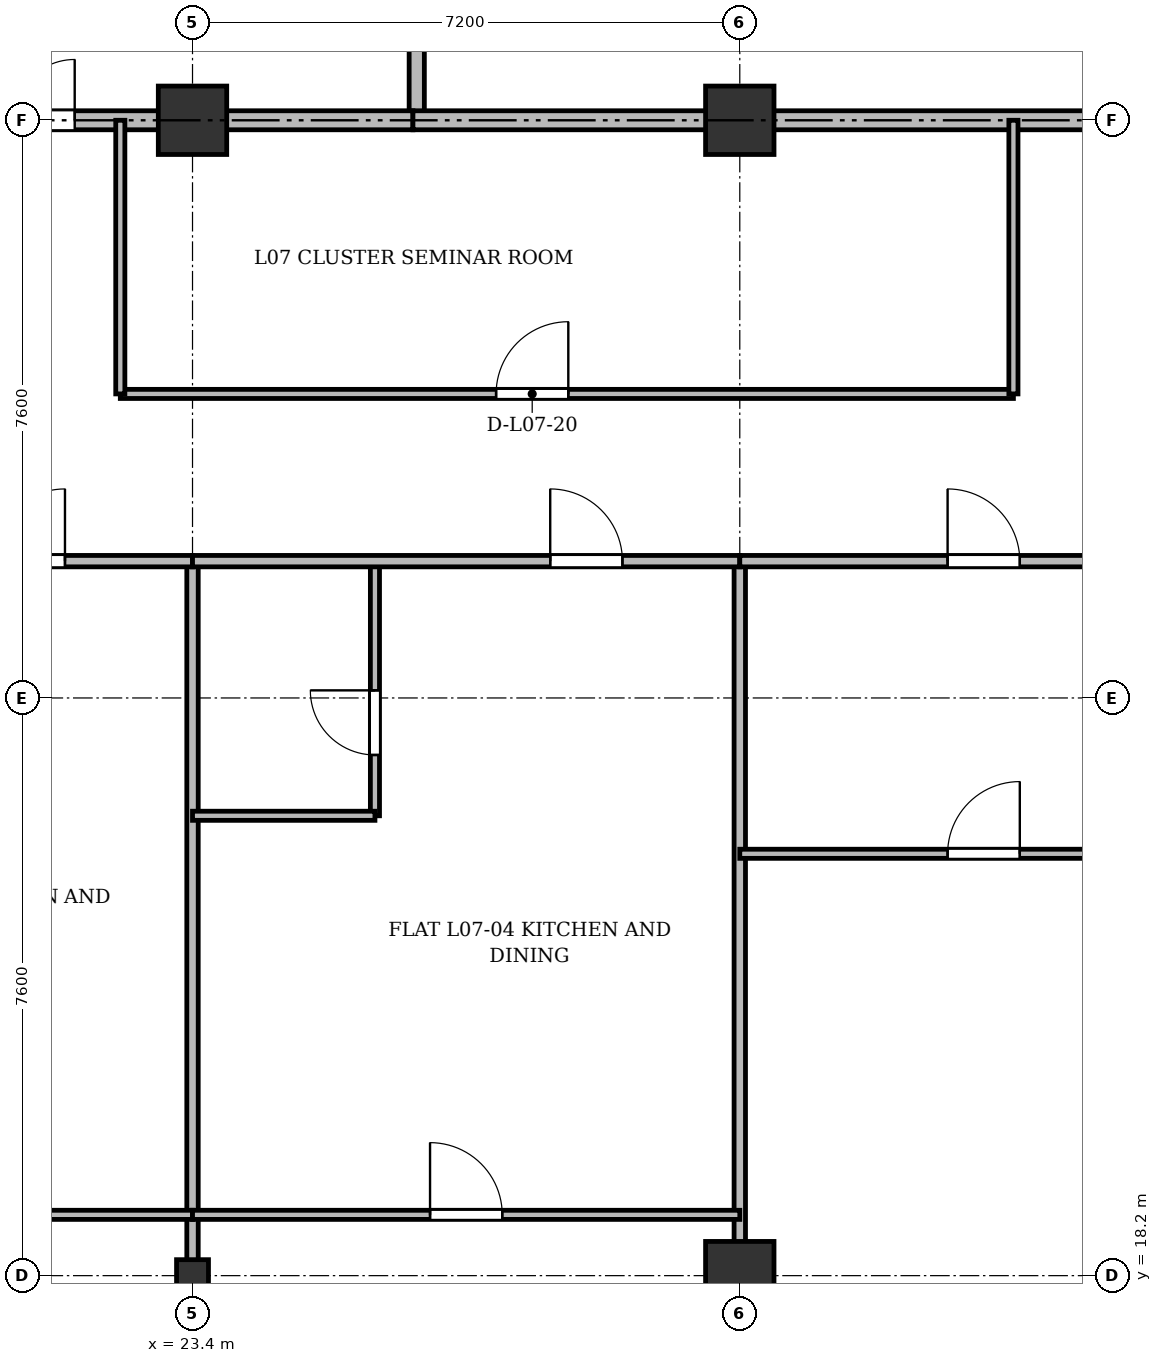
"""IFC4 building model, lengths in metres.
Left out: names, types, materials, properties, quantities, classifications, styles, units other than length and angle.
Written with IfcOpenShell. Run it as: python <this file> out.ifc"""

import sys

from ifc_helpers import new_model, si_unit, direction, frame, frame_2d, origin, origin_2d, place, context, subcontext, project, spatial, rectangle, i_section, extrude, source, transform, mapped, element, fill, save


model = new_model("IFC4")
c1 = context("Model", 3, precision=1e-05, world=origin(), true_north=direction((0.0, 1.0)))
c2 = subcontext(c1, "Body", "Model", "MODEL_VIEW")
j1 = project(units=[si_unit("LENGTHUNIT", "METRE"), si_unit("PLANEANGLEUNIT", "RADIAN")], contexts=[c1])
p1 = place(None, origin())
s1 = spatial("IfcSite", under=j1, at=p1, CompositionType="ELEMENT")
p2 = place(p1, origin())
s2 = spatial("IfcBuilding", under=s1, at=p2, CompositionType="ELEMENT")
p3 = place(p2, frame((0.0, 0.0, 30.7)))
s3 = spatial("IfcBuildingStorey", under=s2, at=p3, CompositionType="ELEMENT", Elevation=30.7)
m1 = source(origin(), c2, "Body", "SweptSolid", [
    extrude(i_section(OverallWidth=0.42, OverallDepth=0.42, WebThickness=0.026, FlangeThickness=0.04, at=origin_2d()), origin(), (0.0, 0.0, 1.0), 3.6),
])
p4 = place(p3, frame((23.4, 18.2, 0.0), z_axis=(0.0, 0.0, 1.0), x_axis=(1.0, 0.0, 0.0)))
e1 = element("IfcColumn", 1, at=p4, inside=s3, PredefinedType="COLUMN", context=c2, shape_type="MappedRepresentation", body=[
    mapped(m1, transform((0.0, 0.0, 0.0), x_axis=(1.0, 0.0, 0.0), y_axis=(0.0, 1.0, 0.0), z_axis=(0.0, 0.0, 1.0), scale=1.0)),
])
m2 = source(origin(), c2, "Body", "SweptSolid", [
    extrude(rectangle(XDim=0.9, YDim=0.9, at=origin_2d()), origin(), (0.0, 0.0, 1.0), 3.6),
])
for number, where, z_axis, x_axis in (
    (2, (23.4, 33.4, 0.0), (0.0, 0.0, 1.0), (1.0, 0.0, 0.0)),
    (3, (30.6, 18.2, 0.0), (0.0, 0.0, 1.0), (1.0, 0.0, 0.0)),
    (4, (30.6, 33.4, 0.0), (0.0, 0.0, 1.0), (1.0, 0.0, 0.0)),
):
    element("IfcColumn", number, at=place(p3, frame(where, z_axis=z_axis, x_axis=x_axis)), inside=s3, PredefinedType="COLUMN", context=c2, shape_type="MappedRepresentation", body=[
        mapped(m2, transform((0.0, 0.0, 0.0), x_axis=(1.0, 0.0, 0.0), y_axis=(0.0, 1.0, 0.0), z_axis=(0.0, 0.0, 1.0), scale=1.0)),
    ])
p5 = place(p3, frame((26.35, 33.4, 0.0), z_axis=(0.0, 0.0, 1.0), x_axis=(0.0, 1.0, 0.0)))
e5 = element("IfcWall", 5, at=p5, inside=s3, PredefinedType="SOLIDWALL", context=c2, shape_type="SweptSolid", body=[
    extrude(rectangle(XDim=11.3, YDim=0.2, at=frame_2d((5.65, 0.0))), origin(), (0.0, 0.0, 1.0), 2.69),
])
p6 = place(p3, frame((19.5, 33.4, 0.0), z_axis=(0.0, 0.0, 1.0), x_axis=(1.0, 0.0, 0.0)))
e6 = element("IfcWall", 6, at=p6, inside=s3, PredefinedType="PARTITIONING", context=c2, shape_type="SweptSolid", body=[
    extrude(rectangle(XDim=6.8, YDim=0.25, at=frame_2d((3.4, 0.0))), origin(), (0.0, 0.0, 1.0), 2.69),
])
p7 = place(p6, frame((0.75, 0.0, 0.0)))
e7 = element("IfcOpeningElement", 7, at=p7, cuts=e6, PredefinedType="OPENING", context=c2, shape_type="SweptSolid", body=[
    extrude(rectangle(XDim=1.6, YDim=2.2, at=frame_2d((0.8, 1.1))), frame((0.0, 0.135, 0.0), z_axis=(0.0, -1.0, 0.0), x_axis=(1.0, 0.0, 0.0)), (0.0, 0.0, 1.0), 0.27),
])
p8 = place(p3, frame((26.3, 33.4, 0.0), z_axis=(0.0, 0.0, 1.0), x_axis=(1.0, 0.0, 0.0)))
e8 = element("IfcWall", 8, at=p8, inside=s3, PredefinedType="PARTITIONING", context=c2, shape_type="SweptSolid", body=[
    extrude(rectangle(XDim=20.85, YDim=0.25, at=frame_2d((10.425, 0.0))), origin(), (0.0, 0.0, 1.0), 2.69),
])
p9 = place(p8, frame((9.2, 0.0, 0.0)))
e9 = element("IfcOpeningElement", 9, at=p9, cuts=e8, PredefinedType="OPENING", context=c2, shape_type="SweptSolid", body=[
    extrude(rectangle(XDim=1.6, YDim=2.2, at=frame_2d((0.8, 1.1))), frame((0.0, 0.135, 0.0), z_axis=(0.0, -1.0, 0.0), x_axis=(1.0, 0.0, 0.0)), (0.0, 0.0, 1.0), 0.27),
])
p10 = place(p3, frame((22.45, 29.8, 0.0), z_axis=(0.0, 0.0, 1.0), x_axis=(1.0, 0.0, 0.0)))
e10 = element("IfcWall", 10, at=p10, inside=s3, PredefinedType="PARTITIONING", context=c2, shape_type="SweptSolid", body=[
    extrude(rectangle(XDim=11.75, YDim=0.12, at=frame_2d((5.875, 0.0))), origin(), (0.0, 0.0, 1.0), 2.752),
])
p11 = place(p10, frame((4.944, 0.0, 0.0)))
e11 = element("IfcOpeningElement", 11, at=p11, cuts=e10, PredefinedType="OPENING", context=c2, shape_type="SweptSolid", body=[
    extrude(rectangle(XDim=0.95, YDim=2.15, at=frame_2d((0.475, 1.075))), frame((0.0, 0.07, 0.0), z_axis=(0.0, -1.0, 0.0), x_axis=(1.0, 0.0, 0.0)), (0.0, 0.0, 1.0), 0.14),
])
for number, where, z_axis, x_axis in (
    (12, (22.45, 29.8, 0.0), (0.0, 0.0, 1.0), (0.0, 1.0, 0.0)),
    (13, (34.2, 29.8, 0.0), (0.0, 0.0, 1.0), (0.0, 1.0, 0.0)),
):
    element("IfcWall", number, at=place(p3, frame(where, z_axis=z_axis, x_axis=x_axis)), inside=s3, PredefinedType="PARTITIONING", context=c2, shape_type="SweptSolid", body=[
        extrude(rectangle(XDim=3.6, YDim=0.12, at=frame_2d((1.8, 0.0))), origin(), (0.0, 0.0, 1.0), 2.69),
    ])
for number, where, z_axis, x_axis in (
    (14, (23.4, 3.145, 0.0), (0.0, 0.0, 1.0), (0.0, 1.0, 0.0)),
    (15, (30.6, 3.145, 0.0), (0.0, 0.0, 1.0), (0.0, 1.0, 0.0)),
):
    element("IfcWall", number, at=place(p3, frame(where, z_axis=z_axis, x_axis=x_axis)), inside=s3, PredefinedType="PARTITIONING", context=c2, shape_type="SweptSolid", body=[
        extrude(rectangle(XDim=24.455, YDim=0.15, at=frame_2d((12.228, 0.0))), origin(), (0.0, 0.0, 1.0), 2.752),
    ])
p12 = place(p3, frame((15.6, 19.0, 0.0), z_axis=(0.0, 0.0, 1.0), x_axis=(1.0, 0.0, 0.0)))
e16 = element("IfcWall", 16, at=p12, inside=s3, PredefinedType="PARTITIONING", context=c2, shape_type="SweptSolid", body=[
    extrude(rectangle(XDim=7.8, YDim=0.12, at=frame_2d((3.9, 0.0))), origin(), (0.0, 0.0, 1.0), 2.752),
])
p13 = place(p12, frame((3.333, 0.0, 0.0)))
e17 = element("IfcOpeningElement", 17, at=p13, cuts=e16, PredefinedType="OPENING", context=c2, shape_type="SweptSolid", body=[
    extrude(rectangle(XDim=0.95, YDim=2.15, at=frame_2d((0.475, 1.075))), frame((0.0, 0.07, 0.0), z_axis=(0.0, -1.0, 0.0), x_axis=(1.0, 0.0, 0.0)), (0.0, 0.0, 1.0), 0.14),
])
p14 = place(p3, frame((15.6, 27.6, 0.0), z_axis=(0.0, 0.0, 1.0), x_axis=(1.0, 0.0, 0.0)))
e18 = element("IfcWall", 18, at=p14, inside=s3, PredefinedType="PARTITIONING", context=c2, shape_type="SweptSolid", body=[
    extrude(rectangle(XDim=7.8, YDim=0.15, at=frame_2d((3.9, 0.0))), origin(), (0.0, 0.0, 1.0), 2.752),
])
p15 = place(p14, frame((5.172, 0.0, 0.0)))
e19 = element("IfcOpeningElement", 19, at=p15, cuts=e18, PredefinedType="OPENING", context=c2, shape_type="SweptSolid", body=[
    extrude(rectangle(XDim=0.95, YDim=2.15, at=frame_2d((0.475, 1.075))), frame((0.0, 0.085, 0.0), z_axis=(0.0, -1.0, 0.0), x_axis=(1.0, 0.0, 0.0)), (0.0, 0.0, 1.0), 0.17),
])
p16 = place(p3, frame((23.4, 19.0, 0.0), z_axis=(0.0, 0.0, 1.0), x_axis=(1.0, 0.0, 0.0)))
e20 = element("IfcWall", 20, at=p16, inside=s3, PredefinedType="PARTITIONING", context=c2, shape_type="SweptSolid", body=[
    extrude(rectangle(XDim=7.2, YDim=0.12, at=frame_2d((3.6, 0.0))), origin(), (0.0, 0.0, 1.0), 2.752),
])
p17 = place(p16, frame((3.125, 0.0, 0.0)))
e21 = element("IfcOpeningElement", 21, at=p17, cuts=e20, PredefinedType="OPENING", context=c2, shape_type="SweptSolid", body=[
    extrude(rectangle(XDim=0.95, YDim=2.15, at=frame_2d((0.475, 1.075))), frame((0.0, 0.07, 0.0), z_axis=(0.0, -1.0, 0.0), x_axis=(1.0, 0.0, 0.0)), (0.0, 0.0, 1.0), 0.14),
])
p18 = place(p3, frame((25.8, 24.25, 0.0), z_axis=(0.0, 0.0, 1.0), x_axis=(0.0, 1.0, 0.0)))
e22 = element("IfcWall", 22, at=p18, inside=s3, PredefinedType="PARTITIONING", context=c2, shape_type="SweptSolid", body=[
    extrude(rectangle(XDim=3.35, YDim=0.12, at=frame_2d((1.675, 0.0))), origin(), (0.0, 0.0, 1.0), 2.94),
])
p19 = place(p18, frame((0.8, 0.0, 0.0)))
e23 = element("IfcOpeningElement", 23, at=p19, cuts=e22, PredefinedType="OPENING", context=c2, shape_type="SweptSolid", body=[
    extrude(rectangle(XDim=0.85, YDim=2.1, at=frame_2d((0.425, 1.05))), frame((0.0, 0.07, 0.0), z_axis=(0.0, -1.0, 0.0), x_axis=(1.0, 0.0, 0.0)), (0.0, 0.0, 1.0), 0.14),
])
p20 = place(p3, frame((23.4, 24.25, 0.0), z_axis=(0.0, 0.0, 1.0), x_axis=(1.0, 0.0, 0.0)))
e24 = element("IfcWall", 24, at=p20, inside=s3, PredefinedType="PARTITIONING", context=c2, shape_type="SweptSolid", body=[
    extrude(rectangle(XDim=2.4, YDim=0.12, at=frame_2d((1.2, 0.0))), origin(), (0.0, 0.0, 1.0), 2.752),
])
p21 = place(p3, frame((23.4, 27.6, 0.0), z_axis=(0.0, 0.0, 1.0), x_axis=(1.0, 0.0, 0.0)))
e25 = element("IfcWall", 25, at=p21, inside=s3, PredefinedType="PARTITIONING", context=c2, shape_type="SweptSolid", body=[
    extrude(rectangle(XDim=7.2, YDim=0.15, at=frame_2d((3.6, 0.0))), origin(), (0.0, 0.0, 1.0), 2.752),
])
p22 = place(p21, frame((4.706, 0.0, 0.0)))
e26 = element("IfcOpeningElement", 26, at=p22, cuts=e25, PredefinedType="OPENING", context=c2, shape_type="SweptSolid", body=[
    extrude(rectangle(XDim=0.95, YDim=2.15, at=frame_2d((0.475, 1.075))), frame((0.0, 0.085, 0.0), z_axis=(0.0, -1.0, 0.0), x_axis=(1.0, 0.0, 0.0)), (0.0, 0.0, 1.0), 0.17),
])
p23 = place(p3, frame((30.6, 27.6, 0.0), z_axis=(0.0, 0.0, 1.0), x_axis=(1.0, 0.0, 0.0)))
e27 = element("IfcWall", 27, at=p23, inside=s3, PredefinedType="PARTITIONING", context=c2, shape_type="SweptSolid", body=[
    extrude(rectangle(XDim=6.6, YDim=0.15, at=frame_2d((3.3, 0.0))), origin(), (0.0, 0.0, 1.0), 2.752),
])
p24 = place(p23, frame((2.734, 0.0, 0.0)))
e28 = element("IfcOpeningElement", 28, at=p24, cuts=e27, PredefinedType="OPENING", context=c2, shape_type="SweptSolid", body=[
    extrude(rectangle(XDim=0.95, YDim=2.15, at=frame_2d((0.475, 1.075))), frame((0.0, 0.085, 0.0), z_axis=(0.0, -1.0, 0.0), x_axis=(1.0, 0.0, 0.0)), (0.0, 0.0, 1.0), 0.17),
])
p25 = place(p3, frame((30.6, 23.75, 0.0), z_axis=(0.0, 0.0, 1.0), x_axis=(1.0, 0.0, 0.0)))
e29 = element("IfcWall", 29, at=p25, inside=s3, PredefinedType="PARTITIONING", context=c2, shape_type="SweptSolid", body=[
    extrude(rectangle(XDim=6.6, YDim=0.12, at=frame_2d((3.3, 0.0))), origin(), (0.0, 0.0, 1.0), 2.752),
])
p26 = place(p25, frame((2.734, 0.0, 0.0)))
e30 = element("IfcOpeningElement", 30, at=p26, cuts=e29, PredefinedType="OPENING", context=c2, shape_type="SweptSolid", body=[
    extrude(rectangle(XDim=0.95, YDim=2.15, at=frame_2d((0.475, 1.075))), frame((0.0, 0.07, 0.0), z_axis=(0.0, -1.0, 0.0), x_axis=(1.0, 0.0, 0.0)), (0.0, 0.0, 1.0), 0.14),
])
m3 = source(origin(), c2, "Body", "SweptSolid", [
    extrude(rectangle(XDim=1.6, YDim=2.2, at=frame_2d((0.8, 1.1))), frame((0.0, 0.025, 0.0), z_axis=(0.0, -1.0, 0.0), x_axis=(1.0, 0.0, 0.0)), (0.0, 0.0, 1.0), 0.05),
])
p27 = place(p7, origin())
e31 = element("IfcDoor", 31, at=p27, inside=s3, OperationType="DOUBLE_DOOR_SINGLE_SWING", PredefinedType="DOOR", context=c2, shape_type="MappedRepresentation", body=[
    mapped(m3, transform((0.0, 0.0, 0.0), x_axis=(1.0, 0.0, 0.0), y_axis=(0.0, 1.0, 0.0), z_axis=(0.0, 0.0, 1.0), scale=1.0)),
])
fill(e7, e31)
m4 = source(origin(), c2, "Body", "SweptSolid", [
    extrude(rectangle(XDim=0.95, YDim=2.15, at=frame_2d((0.475, 1.075))), frame((0.0, 0.025, 0.0), z_axis=(0.0, -1.0, 0.0), x_axis=(1.0, 0.0, 0.0)), (0.0, 0.0, 1.0), 0.05),
])
p28 = place(p11, origin())
e32 = element("IfcDoor", 32, at=p28, inside=s3, OperationType="SINGLE_SWING_RIGHT", PredefinedType="DOOR", context=c2, shape_type="MappedRepresentation", body=[
    mapped(m4, transform((0.0, 0.0, 0.0), x_axis=(1.0, 0.0, 0.0), y_axis=(0.0, 1.0, 0.0), z_axis=(0.0, 0.0, 1.0), scale=1.0)),
])
fill(e11, e32)
p29 = place(p15, origin())
e33 = element("IfcDoor", 33, at=p29, inside=s3, OperationType="SINGLE_SWING_RIGHT", PredefinedType="DOOR", context=c2, shape_type="MappedRepresentation", body=[
    mapped(m4, transform((0.0, 0.0, 0.0), x_axis=(1.0, 0.0, 0.0), y_axis=(0.0, 1.0, 0.0), z_axis=(0.0, 0.0, 1.0), scale=1.0)),
])
fill(e19, e33)
p30 = place(p17, origin())
e34 = element("IfcDoor", 34, at=p30, inside=s3, OperationType="SINGLE_SWING_LEFT", PredefinedType="DOOR", context=c2, shape_type="MappedRepresentation", body=[
    mapped(m4, transform((0.0, 0.0, 0.0), x_axis=(1.0, 0.0, 0.0), y_axis=(0.0, 1.0, 0.0), z_axis=(0.0, 0.0, 1.0), scale=1.0)),
])
fill(e21, e34)
m5 = source(origin(), c2, "Body", "SweptSolid", [
    extrude(rectangle(XDim=0.85, YDim=2.1, at=frame_2d((0.425, 1.05))), frame((0.0, 0.025, 0.0), z_axis=(0.0, -1.0, 0.0), x_axis=(1.0, 0.0, 0.0)), (0.0, 0.0, 1.0), 0.05),
])
p31 = place(p19, origin())
e35 = element("IfcDoor", 35, at=p31, inside=s3, OperationType="SINGLE_SWING_RIGHT", PredefinedType="DOOR", context=c2, shape_type="MappedRepresentation", body=[
    mapped(m5, transform((0.0, 0.0, 0.0), x_axis=(1.0, 0.0, 0.0), y_axis=(0.0, 1.0, 0.0), z_axis=(0.0, 0.0, 1.0), scale=1.0)),
])
fill(e23, e35)
p32 = place(p22, origin())
e36 = element("IfcDoor", 36, at=p32, inside=s3, OperationType="SINGLE_SWING_LEFT", PredefinedType="DOOR", context=c2, shape_type="MappedRepresentation", body=[
    mapped(m4, transform((0.0, 0.0, 0.0), x_axis=(1.0, 0.0, 0.0), y_axis=(0.0, 1.0, 0.0), z_axis=(0.0, 0.0, 1.0), scale=1.0)),
])
fill(e26, e36)
p33 = place(p24, origin())
e37 = element("IfcDoor", 37, at=p33, inside=s3, OperationType="SINGLE_SWING_LEFT", PredefinedType="DOOR", context=c2, shape_type="MappedRepresentation", body=[
    mapped(m4, transform((0.0, 0.0, 0.0), x_axis=(1.0, 0.0, 0.0), y_axis=(0.0, 1.0, 0.0), z_axis=(0.0, 0.0, 1.0), scale=1.0)),
])
fill(e28, e37)
p34 = place(p26, origin())
e38 = element("IfcDoor", 38, at=p34, inside=s3, OperationType="SINGLE_SWING_RIGHT", PredefinedType="DOOR", context=c2, shape_type="MappedRepresentation", body=[
    mapped(m4, transform((0.0, 0.0, 0.0), x_axis=(1.0, 0.0, 0.0), y_axis=(0.0, 1.0, 0.0), z_axis=(0.0, 0.0, 1.0), scale=1.0)),
])
fill(e30, e38)
save(model, sys.argv[1])
